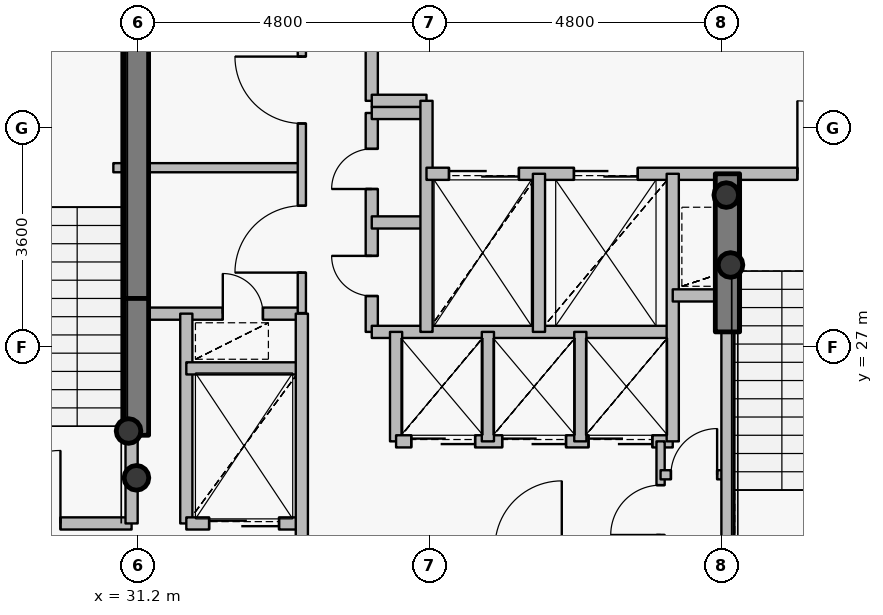
"""IFC4 building model, lengths in metres.
Left out: names, types, materials, properties, quantities, classifications, styles, units other than length and angle.
Written with IfcOpenShell. Run it as: python <this file> out.ifc"""

import sys

from ifc_helpers import new_model, si_unit, direction, frame, frame_2d, origin, origin_2d, place, context, subcontext, project, spatial, rectangle, hollow_circle, extrude, source, transform, mapped, element, fill, save


model = new_model("IFC4")
c1 = context("Model", 3, precision=1e-05, world=origin(), true_north=direction((0.0, 1.0)))
c2 = subcontext(c1, "Body", "Model", "MODEL_VIEW")
j1 = project(units=[si_unit("LENGTHUNIT", "METRE"), si_unit("PLANEANGLEUNIT", "RADIAN")], contexts=[c1])
p1 = place(None, origin())
s1 = spatial("IfcSite", under=j1, at=p1, CompositionType="ELEMENT")
p2 = place(p1, origin())
s2 = spatial("IfcBuilding", under=s1, at=p2, CompositionType="ELEMENT")
p3 = place(p2, frame((0.0, 0.0, 299.25)))
s3 = spatial("IfcBuildingStorey", under=s2, at=p3, CompositionType="ELEMENT", Elevation=299.25)
p4 = place(p3, frame((31.18, 27.8, 0.0), z_axis=(0.0, 0.0, 1.0), x_axis=(0.0, 1.0, 0.0)))
e1 = element("IfcWall", 1, at=p4, inside=s3, PredefinedType="SHEAR", context=c2, shape_type="SweptSolid", body=[
    extrude(rectangle(XDim=4.75, YDim=0.4, at=frame_2d((2.375, 0.0))), origin(), (0.0, 0.0, 1.0), 3.75),
])
for number, where, z_axis, x_axis in (
    (2, (31.05, 25.62, 0.0), (0.0, 0.0, 1.0), (1.0, 0.0, 0.0)),
    (3, (31.18, 24.85, 0.0), (0.0, 0.0, 1.0), (1.0, 0.0, 0.0)),
    (4, (40.95, 28.35, 0.0), (0.0, 0.0, 1.0), (1.0, 0.0, 0.0)),
    (5, (40.88, 29.5, 0.0), (0.0, 0.0, 1.0), (1.0, 0.0, 0.0)),
):
    element("IfcColumn", number, at=place(p3, frame(where, z_axis=z_axis, x_axis=x_axis)), inside=s3, PredefinedType="COLUMN", context=c2, shape_type="SweptSolid", body=[
        extrude(hollow_circle(Radius=0.203, WallThickness=0.016, at=origin_2d()), origin(), (0.0, 0.0, 1.0), 3.75),
    ])
p5 = place(p3, frame((31.18, 25.55, 0.0), z_axis=(0.0, 0.0, 1.0), x_axis=(0.0, 1.0, 0.0)))
e6 = element("IfcWall", 6, at=p5, inside=s3, PredefinedType="SHEAR", context=c2, shape_type="SweptSolid", body=[
    extrude(rectangle(XDim=2.25, YDim=0.4, at=frame_2d((1.125, 0.0))), origin(), (0.0, 0.0, 1.0), 3.1),
])
p6 = place(p3, frame((40.9, 27.25, 0.0), z_axis=(0.0, 0.0, 1.0), x_axis=(0.0, 1.0, 0.0)))
e7 = element("IfcWall", 7, at=p6, inside=s3, PredefinedType="SHEAR", context=c2, shape_type="SweptSolid", body=[
    extrude(rectangle(XDim=2.6, YDim=0.4, at=frame_2d((1.3, 0.0))), origin(), (0.0, 0.0, 1.0), 3.1),
])
p7 = place(p3, frame((27.56, 24.1, 0.0), z_axis=(0.0, 0.0, 1.0), x_axis=(1.0, 0.0, 0.0)))
e8 = element("IfcWall", 8, at=p7, inside=s3, PredefinedType="PARTITIONING", context=c2, shape_type="SweptSolid", body=[
    extrude(rectangle(XDim=3.54, YDim=0.2, at=frame_2d((1.77, 0.0))), origin(), (0.0, 0.0, 1.0), 3.5),
])
p8 = place(p7, frame((1.17, 0.0, 0.0)))
e9 = element("IfcOpeningElement", 9, at=p8, cuts=e8, PredefinedType="OPENING", context=c2, shape_type="SweptSolid", body=[
    extrude(rectangle(XDim=1.2, YDim=2.15, at=origin_2d()), frame((0.6, 0.11, 1.075), z_axis=(0.0, -1.0, 0.0), x_axis=(1.0, 0.0, 0.0)), (0.0, 0.0, 1.0), 0.22),
])
p9 = place(p3, frame((30.8, 29.95, 0.0), z_axis=(0.0, 0.0, 1.0), x_axis=(1.0, 0.0, 0.0)))
e10 = element("IfcWall", 10, at=p9, inside=s3, PredefinedType="PARTITIONING", context=c2, shape_type="SweptSolid", body=[
    extrude(rectangle(XDim=3.1, YDim=0.15, at=frame_2d((1.55, 0.0))), origin(), (0.0, 0.0, 1.0), 3.085),
])
p10 = place(p3, frame((31.1, 24.1, 0.0), z_axis=(0.0, 0.0, 1.0), x_axis=(0.0, 1.0, 0.0)))
e11 = element("IfcWall", 11, at=p10, inside=s3, PredefinedType="PARTITIONING", context=c2, shape_type="SweptSolid", body=[
    extrude(rectangle(XDim=1.44, YDim=0.2, at=frame_2d((0.72, 0.0))), origin(), (0.0, 0.0, 1.0), 3.5),
])
p11 = place(p3, frame((31.1, 27.55, 0.0), z_axis=(0.0, 0.0, 1.0), x_axis=(1.0, 0.0, 0.0)))
e12 = element("IfcWall", 12, at=p11, inside=s3, PredefinedType="PARTITIONING", context=c2, shape_type="SweptSolid", body=[
    extrude(rectangle(XDim=2.8, YDim=0.2, at=frame_2d((1.4, 0.0))), origin(), (0.0, 0.0, 1.0), 3.085),
])
p12 = place(p11, frame((1.5, 0.0, 0.0)))
e13 = element("IfcOpeningElement", 13, at=p12, cuts=e12, PredefinedType="OPENING", context=c2, shape_type="SweptSolid", body=[
    extrude(rectangle(XDim=0.66, YDim=2.05, at=origin_2d()), frame((0.33, 0.11, 1.025), z_axis=(0.0, -1.0, 0.0), x_axis=(1.0, 0.0, 0.0)), (0.0, 0.0, 1.0), 0.22),
])
p13 = place(p3, frame((32.0, 24.1, 0.0), z_axis=(0.0, 0.0, 1.0), x_axis=(0.0, 1.0, 0.0)))
e14 = element("IfcWall", 14, at=p13, inside=s3, PredefinedType="PARTITIONING", context=c2, shape_type="SweptSolid", body=[
    extrude(rectangle(XDim=3.45, YDim=0.2, at=frame_2d((1.725, 0.0))), origin(), (0.0, 0.0, 1.0), 3.5),
])
p14 = place(p3, frame((32.0, 24.1, 0.0), z_axis=(0.0, 0.0, 1.0), x_axis=(1.0, 0.0, 0.0)))
e15 = element("IfcWall", 15, at=p14, inside=s3, PredefinedType="PARTITIONING", context=c2, shape_type="SweptSolid", body=[
    extrude(rectangle(XDim=1.9, YDim=0.2, at=frame_2d((0.95, 0.0))), origin(), (0.0, 0.0, 1.0), 3.085),
])
p15 = place(p14, frame((0.375, 0.0, 0.0)))
e16 = element("IfcOpeningElement", 16, at=p15, cuts=e15, PredefinedType="OPENING", context=c2, shape_type="SweptSolid", body=[
    extrude(rectangle(XDim=1.15, YDim=2.15, at=origin_2d()), frame((0.575, 0.11, 1.075), z_axis=(0.0, -1.0, 0.0), x_axis=(1.0, 0.0, 0.0)), (0.0, 0.0, 1.0), 0.22),
])
p16 = place(p3, frame((32.0, 26.65, 0.0), z_axis=(0.0, 0.0, 1.0), x_axis=(1.0, 0.0, 0.0)))
e17 = element("IfcWall", 17, at=p16, inside=s3, PredefinedType="PARTITIONING", context=c2, shape_type="SweptSolid", body=[
    extrude(rectangle(XDim=1.9, YDim=0.2, at=frame_2d((0.95, 0.0))), origin(), (0.0, 0.0, 1.0), 3.085),
])
p17 = place(p3, frame((33.9, 20.9, 0.0), z_axis=(0.0, 0.0, 1.0), x_axis=(0.0, 1.0, 0.0)))
e18 = element("IfcWall", 18, at=p17, inside=s3, PredefinedType="PARTITIONING", context=c2, shape_type="SweptSolid", body=[
    extrude(rectangle(XDim=6.65, YDim=0.2, at=frame_2d((3.325, 0.0))), origin(), (0.0, 0.0, 1.0), 3.085),
])
p18 = place(p3, frame((33.9, 27.56, 0.0), z_axis=(0.0, 0.0, 1.0), x_axis=(0.0, 1.0, 0.0)))
e19 = element("IfcWall", 19, at=p18, inside=s3, PredefinedType="PARTITIONING", context=c2, shape_type="SweptSolid", body=[
    extrude(rectangle(XDim=5.54, YDim=0.135, at=frame_2d((2.77, 0.0))), origin(), (0.0, 0.0, 1.0), 3.085),
])
p19 = place(p18, frame((0.665, 0.0, 0.0)))
e20 = element("IfcOpeningElement", 20, at=p19, cuts=e19, PredefinedType="OPENING", context=c2, shape_type="SweptSolid", body=[
    extrude(rectangle(XDim=1.1, YDim=2.15, at=origin_2d()), frame((0.55, 0.078, 1.075), z_axis=(0.0, -1.0, 0.0), x_axis=(1.0, 0.0, 0.0)), (0.0, 0.0, 1.0), 0.155),
])
p20 = place(p18, frame((3.117, 0.0, 0.0)))
e21 = element("IfcOpeningElement", 21, at=p20, cuts=e19, PredefinedType="OPENING", context=c2, shape_type="SweptSolid", body=[
    extrude(rectangle(XDim=1.1, YDim=2.15, at=origin_2d()), frame((0.55, 0.078, 1.075), z_axis=(0.0, -1.0, 0.0), x_axis=(1.0, 0.0, 0.0)), (0.0, 0.0, 1.0), 0.155),
])
p21 = place(p3, frame((35.05, 27.25, 0.0), z_axis=(0.0, 0.0, 1.0), x_axis=(0.0, 1.0, 0.0)))
e22 = element("IfcWall", 22, at=p21, inside=s3, PredefinedType="PARTITIONING", context=c2, shape_type="SweptSolid", body=[
    extrude(rectangle(XDim=3.6, YDim=0.2, at=frame_2d((1.8, 0.0))), origin(), (0.0, 0.0, 1.0), 3.5),
])
p22 = place(p21, frame((0.59, 0.0, 0.0)))
e23 = element("IfcOpeningElement", 23, at=p22, cuts=e22, PredefinedType="OPENING", context=c2, shape_type="SweptSolid", body=[
    extrude(rectangle(XDim=0.66, YDim=2.05, at=origin_2d()), frame((0.33, 0.11, 1.025), z_axis=(0.0, -1.0, 0.0), x_axis=(1.0, 0.0, 0.0)), (0.0, 0.0, 1.0), 0.22),
])
p23 = place(p21, frame((2.35, 0.0, 0.0)))
e24 = element("IfcOpeningElement", 24, at=p23, cuts=e22, PredefinedType="OPENING", context=c2, shape_type="SweptSolid", body=[
    extrude(rectangle(XDim=0.66, YDim=2.05, at=origin_2d()), frame((0.33, 0.11, 1.025), z_axis=(0.0, -1.0, 0.0), x_axis=(1.0, 0.0, 0.0)), (0.0, 0.0, 1.0), 0.22),
])
p24 = place(p3, frame((35.05, 27.25, 0.0), z_axis=(0.0, 0.0, 1.0), x_axis=(1.0, 0.0, 0.0)))
e25 = element("IfcWall", 25, at=p24, inside=s3, PredefinedType="PARTITIONING", context=c2, shape_type="SweptSolid", body=[
    extrude(rectangle(XDim=4.95, YDim=0.2, at=frame_2d((2.475, 0.0))), origin(), (0.0, 0.0, 1.0), 3.085),
])
for number, where, z_axis, x_axis in (
    (26, (35.05, 29.05, 0.0), (0.0, 0.0, 1.0), (1.0, 0.0, 0.0)),
    (27, (35.05, 30.85, 0.0), (0.0, 0.0, 1.0), (1.0, 0.0, 0.0)),
):
    element("IfcWall", number, at=place(p3, frame(where, z_axis=z_axis, x_axis=x_axis)), inside=s3, PredefinedType="PARTITIONING", context=c2, shape_type="SweptSolid", body=[
        extrude(rectangle(XDim=0.9, YDim=0.2, at=frame_2d((0.45, 0.0))), origin(), (0.0, 0.0, 1.0), 3.5),
    ])
p25 = place(p3, frame((35.05, 31.05, 0.0), z_axis=(0.0, 0.0, 1.0), x_axis=(0.0, 1.0, 0.0)))
e28 = element("IfcWall", 28, at=p25, inside=s3, PredefinedType="PARTITIONING", context=c2, shape_type="SweptSolid", body=[
    extrude(rectangle(XDim=2.05, YDim=0.2, at=frame_2d((1.025, 0.0))), origin(), (0.0, 0.0, 1.0), 3.085),
])
p26 = place(p3, frame((35.05, 31.05, 0.0), z_axis=(0.0, 0.0, 1.0), x_axis=(1.0, 0.0, 0.0)))
e29 = element("IfcWall", 29, at=p26, inside=s3, PredefinedType="PARTITIONING", context=c2, shape_type="SweptSolid", body=[
    extrude(rectangle(XDim=0.9, YDim=0.2, at=frame_2d((0.45, 0.0))), origin(), (0.0, 0.0, 1.0), 3.5),
])
p27 = place(p3, frame((35.45, 25.45, 0.0), z_axis=(0.0, 0.0, 1.0), x_axis=(0.0, 1.0, 0.0)))
e30 = element("IfcWall", 30, at=p27, inside=s3, PredefinedType="PARTITIONING", context=c2, shape_type="SweptSolid", body=[
    extrude(rectangle(XDim=1.8, YDim=0.2, at=frame_2d((0.9, 0.0))), origin(), (0.0, 0.0, 1.0), 3.5),
])
p28 = place(p3, frame((35.45, 25.45, 0.0), z_axis=(0.0, 0.0, 1.0), x_axis=(1.0, 0.0, 0.0)))
e31 = element("IfcWall", 31, at=p28, inside=s3, PredefinedType="PARTITIONING", context=c2, shape_type="SweptSolid", body=[
    extrude(rectangle(XDim=4.55, YDim=0.2, at=frame_2d((2.275, 0.0))), origin(), (0.0, 0.0, 1.0), 3.085),
])
p29 = place(p28, frame((0.25, 0.0, 0.0)))
e32 = element("IfcOpeningElement", 32, at=p29, cuts=e31, PredefinedType="OPENING", context=c2, shape_type="SweptSolid", body=[
    extrude(rectangle(XDim=1.05, YDim=2.15, at=origin_2d()), frame((0.525, 0.11, 1.075), z_axis=(0.0, -1.0, 0.0), x_axis=(1.0, 0.0, 0.0)), (0.0, 0.0, 1.0), 0.22),
])
p30 = place(p28, frame((1.745, 0.0, 0.0)))
e33 = element("IfcOpeningElement", 33, at=p30, cuts=e31, PredefinedType="OPENING", context=c2, shape_type="SweptSolid", body=[
    extrude(rectangle(XDim=1.05, YDim=2.15, at=origin_2d()), frame((0.525, 0.11, 1.075), z_axis=(0.0, -1.0, 0.0), x_axis=(1.0, 0.0, 0.0)), (0.0, 0.0, 1.0), 0.22),
])
p31 = place(p28, frame((3.165, 0.0, 0.0)))
e34 = element("IfcOpeningElement", 34, at=p31, cuts=e31, PredefinedType="OPENING", context=c2, shape_type="SweptSolid", body=[
    extrude(rectangle(XDim=1.05, YDim=2.15, at=origin_2d()), frame((0.525, 0.11, 1.075), z_axis=(0.0, -1.0, 0.0), x_axis=(1.0, 0.0, 0.0)), (0.0, 0.0, 1.0), 0.22),
])
p32 = place(p3, frame((35.95, 27.25, 0.0), z_axis=(0.0, 0.0, 1.0), x_axis=(0.0, 1.0, 0.0)))
e35 = element("IfcWall", 35, at=p32, inside=s3, PredefinedType="PARTITIONING", context=c2, shape_type="SweptSolid", body=[
    extrude(rectangle(XDim=3.8, YDim=0.2, at=frame_2d((1.9, 0.0))), origin(), (0.0, 0.0, 1.0), 3.5),
])
p33 = place(p3, frame((35.95, 29.85, 0.0), z_axis=(0.0, 0.0, 1.0), x_axis=(1.0, 0.0, 0.0)))
e36 = element("IfcWall", 36, at=p33, inside=s3, PredefinedType="PARTITIONING", context=c2, shape_type="SweptSolid", body=[
    extrude(rectangle(XDim=8.49, YDim=0.2, at=frame_2d((4.245, 0.0))), origin(), (0.0, 0.0, 1.0), 3.085),
])
p34 = place(p33, frame((6.1, 0.0, 0.0)))
e37 = element("IfcOpeningElement", 37, at=p34, cuts=e36, PredefinedType="OPENING", context=c2, shape_type="SweptSolid", body=[
    extrude(rectangle(XDim=1.2, YDim=2.15, at=origin_2d()), frame((0.6, 0.11, 1.075), z_axis=(0.0, -1.0, 0.0), x_axis=(1.0, 0.0, 0.0)), (0.0, 0.0, 1.0), 0.22),
])
p35 = place(p33, frame((0.37, 0.0, 0.0)))
e38 = element("IfcOpeningElement", 38, at=p35, cuts=e36, PredefinedType="OPENING", context=c2, shape_type="SweptSolid", body=[
    extrude(rectangle(XDim=1.15, YDim=2.15, at=origin_2d()), frame((0.575, 0.11, 1.075), z_axis=(0.0, -1.0, 0.0), x_axis=(1.0, 0.0, 0.0)), (0.0, 0.0, 1.0), 0.22),
])
p36 = place(p33, frame((2.425, 0.0, 0.0)))
e39 = element("IfcOpeningElement", 39, at=p36, cuts=e36, PredefinedType="OPENING", context=c2, shape_type="SweptSolid", body=[
    extrude(rectangle(XDim=1.05, YDim=2.15, at=origin_2d()), frame((0.525, 0.11, 1.075), z_axis=(0.0, -1.0, 0.0), x_axis=(1.0, 0.0, 0.0)), (0.0, 0.0, 1.0), 0.22),
])
p37 = place(p3, frame((36.96, 25.45, 0.0), z_axis=(0.0, 0.0, 1.0), x_axis=(0.0, 1.0, 0.0)))
e40 = element("IfcWall", 40, at=p37, inside=s3, PredefinedType="PARTITIONING", context=c2, shape_type="SweptSolid", body=[
    extrude(rectangle(XDim=1.8, YDim=0.2, at=frame_2d((0.9, 0.0))), origin(), (0.0, 0.0, 1.0), 3.5),
])
p38 = place(p3, frame((37.8, 27.25, 0.0), z_axis=(0.0, 0.0, 1.0), x_axis=(0.0, 1.0, 0.0)))
e41 = element("IfcWall", 41, at=p38, inside=s3, PredefinedType="PARTITIONING", context=c2, shape_type="SweptSolid", body=[
    extrude(rectangle(XDim=2.6, YDim=0.2, at=frame_2d((1.3, 0.0))), origin(), (0.0, 0.0, 1.0), 3.5),
])
p39 = place(p3, frame((38.48, 25.45, 0.0), z_axis=(0.0, 0.0, 1.0), x_axis=(0.0, 1.0, 0.0)))
e42 = element("IfcWall", 42, at=p39, inside=s3, PredefinedType="PARTITIONING", context=c2, shape_type="SweptSolid", body=[
    extrude(rectangle(XDim=1.8, YDim=0.2, at=frame_2d((0.9, 0.0))), origin(), (0.0, 0.0, 1.0), 3.5),
])
p40 = place(p3, frame((39.8, 23.7, 0.0), z_axis=(0.0, 0.0, 1.0), x_axis=(0.0, 1.0, 0.0)))
e43 = element("IfcWall", 43, at=p40, inside=s3, PredefinedType="PARTITIONING", context=c2, shape_type="SweptSolid", body=[
    extrude(rectangle(XDim=1.75, YDim=0.135, at=frame_2d((0.875, 0.0))), origin(), (0.0, 0.0, 1.0), 3.5),
])
p41 = place(p40, frame((0.21, 0.0, 0.0)))
e44 = element("IfcOpeningElement", 44, at=p41, cuts=e43, PredefinedType="OPENING", context=c2, shape_type="SweptSolid", body=[
    extrude(rectangle(XDim=0.82, YDim=2.1, at=origin_2d()), frame((0.41, 0.078, 1.05), z_axis=(0.0, -1.0, 0.0), x_axis=(1.0, 0.0, 0.0)), (0.0, 0.0, 1.0), 0.155),
])
p42 = place(p3, frame((39.8, 24.9, 0.0), z_axis=(0.0, 0.0, 1.0), x_axis=(1.0, 0.0, 0.0)))
e45 = element("IfcWall", 45, at=p42, inside=s3, PredefinedType="PARTITIONING", context=c2, shape_type="SweptSolid", body=[
    extrude(rectangle(XDim=1.1, YDim=0.15, at=frame_2d((0.55, 0.0))), origin(), (0.0, 0.0, 1.0), 3.5),
])
p43 = place(p42, frame((0.17, 0.0, 0.0)))
e46 = element("IfcOpeningElement", 46, at=p43, cuts=e45, PredefinedType="OPENING", context=c2, shape_type="SweptSolid", body=[
    extrude(rectangle(XDim=0.76, YDim=2.1, at=origin_2d()), frame((0.38, 0.085, 1.05), z_axis=(0.0, -1.0, 0.0), x_axis=(1.0, 0.0, 0.0)), (0.0, 0.0, 1.0), 0.17),
])
p44 = place(p3, frame((40.0, 25.45, 0.0), z_axis=(0.0, 0.0, 1.0), x_axis=(0.0, 1.0, 0.0)))
e47 = element("IfcWall", 47, at=p44, inside=s3, PredefinedType="PARTITIONING", context=c2, shape_type="SweptSolid", body=[
    extrude(rectangle(XDim=4.4, YDim=0.2, at=frame_2d((2.2, 0.0))), origin(), (0.0, 0.0, 1.0), 3.5),
])
p45 = place(p3, frame((40.0, 27.85, 0.0), z_axis=(0.0, 0.0, 1.0), x_axis=(1.0, 0.0, 0.0)))
e48 = element("IfcWall", 48, at=p45, inside=s3, PredefinedType="PARTITIONING", context=c2, shape_type="SweptSolid", body=[
    extrude(rectangle(XDim=0.9, YDim=0.2, at=frame_2d((0.45, 0.0))), origin(), (0.0, 0.0, 1.0), 3.5),
])
p46 = place(p3, frame((40.9, 21.33, 0.0), z_axis=(0.0, 0.0, 1.0), x_axis=(0.0, 1.0, 0.0)))
e49 = element("IfcWall", 49, at=p46, inside=s3, PredefinedType="PARTITIONING", context=c2, shape_type="SweptSolid", body=[
    extrude(rectangle(XDim=5.91, YDim=0.2, at=frame_2d((2.955, 0.0))), origin(), (0.0, 0.0, 1.0), 3.035),
])
m1 = source(origin(), c2, "Body", "SweptSolid", [
    extrude(rectangle(XDim=1.2, YDim=2.15, at=origin_2d()), frame((0.6, 0.025, 1.075), z_axis=(0.0, -1.0, 0.0), x_axis=(1.0, 0.0, 0.0)), (0.0, 0.0, 1.0), 0.05),
])
p47 = place(p8, origin())
e50 = element("IfcDoor", 50, at=p47, inside=s3, OperationType="SINGLE_SWING_RIGHT", PredefinedType="DOOR", context=c2, shape_type="MappedRepresentation", body=[
    mapped(m1, transform((0.0, 0.0, 0.0), x_axis=(1.0, 0.0, 0.0), y_axis=(0.0, 1.0, 0.0), z_axis=(0.0, 0.0, 1.0), scale=1.0)),
])
fill(e9, e50)
p48 = place(p34, origin())
e51 = element("IfcDoor", 51, at=p48, inside=s3, OperationType="SINGLE_SWING_LEFT", PredefinedType="DOOR", context=c2, shape_type="MappedRepresentation", body=[
    mapped(m1, transform((0.0, 0.0, 0.0), x_axis=(1.0, 0.0, 0.0), y_axis=(0.0, 1.0, 0.0), z_axis=(0.0, 0.0, 1.0), scale=1.0)),
])
fill(e37, e51)
m2 = source(origin(), c2, "Body", "SweptSolid", [
    extrude(rectangle(XDim=1.15, YDim=2.15, at=origin_2d()), frame((0.575, 0.025, 1.075), z_axis=(0.0, -1.0, 0.0), x_axis=(1.0, 0.0, 0.0)), (0.0, 0.0, 1.0), 0.05),
])
p49 = place(p35, origin())
e52 = element("IfcDoor", 52, at=p49, inside=s3, OperationType="DOUBLE_DOOR_SLIDING", PredefinedType="USERDEFINED", context=c2, shape_type="MappedRepresentation", body=[
    mapped(m2, transform((0.0, 0.0, 0.0), x_axis=(1.0, 0.0, 0.0), y_axis=(0.0, 1.0, 0.0), z_axis=(0.0, 0.0, 1.0), scale=1.0)),
])
fill(e38, e52)
p50 = place(p15, origin())
e53 = element("IfcDoor", 53, at=p50, inside=s3, OperationType="DOUBLE_DOOR_SLIDING", PredefinedType="USERDEFINED", context=c2, shape_type="MappedRepresentation", body=[
    mapped(m2, transform((0.0, 0.0, 0.0), x_axis=(1.0, 0.0, 0.0), y_axis=(0.0, 1.0, 0.0), z_axis=(0.0, 0.0, 1.0), scale=1.0)),
])
fill(e16, e53)
m3 = source(origin(), c2, "Body", "SweptSolid", [
    extrude(rectangle(XDim=1.05, YDim=2.15, at=origin_2d()), frame((0.525, 0.025, 1.075), z_axis=(0.0, -1.0, 0.0), x_axis=(1.0, 0.0, 0.0)), (0.0, 0.0, 1.0), 0.05),
])
p51 = place(p36, origin())
e54 = element("IfcDoor", 54, at=p51, inside=s3, OperationType="DOUBLE_DOOR_SLIDING", PredefinedType="USERDEFINED", context=c2, shape_type="MappedRepresentation", body=[
    mapped(m3, transform((0.0, 0.0, 0.0), x_axis=(1.0, 0.0, 0.0), y_axis=(0.0, 1.0, 0.0), z_axis=(0.0, 0.0, 1.0), scale=1.0)),
])
fill(e39, e54)
p52 = place(p29, origin())
e55 = element("IfcDoor", 55, at=p52, inside=s3, OperationType="DOUBLE_DOOR_SLIDING", PredefinedType="USERDEFINED", context=c2, shape_type="MappedRepresentation", body=[
    mapped(m3, transform((0.0, 0.0, 0.0), x_axis=(1.0, 0.0, 0.0), y_axis=(0.0, 1.0, 0.0), z_axis=(0.0, 0.0, 1.0), scale=1.0)),
])
fill(e32, e55)
p53 = place(p30, origin())
e56 = element("IfcDoor", 56, at=p53, inside=s3, OperationType="DOUBLE_DOOR_SLIDING", PredefinedType="USERDEFINED", context=c2, shape_type="MappedRepresentation", body=[
    mapped(m3, transform((0.0, 0.0, 0.0), x_axis=(1.0, 0.0, 0.0), y_axis=(0.0, 1.0, 0.0), z_axis=(0.0, 0.0, 1.0), scale=1.0)),
])
fill(e33, e56)
p54 = place(p31, origin())
e57 = element("IfcDoor", 57, at=p54, inside=s3, OperationType="DOUBLE_DOOR_SLIDING", PredefinedType="USERDEFINED", context=c2, shape_type="MappedRepresentation", body=[
    mapped(m3, transform((0.0, 0.0, 0.0), x_axis=(1.0, 0.0, 0.0), y_axis=(0.0, 1.0, 0.0), z_axis=(0.0, 0.0, 1.0), scale=1.0)),
])
fill(e34, e57)
m4 = source(origin(), c2, "Body", "SweptSolid", [
    extrude(rectangle(XDim=0.66, YDim=2.05, at=origin_2d()), frame((0.33, 0.025, 1.025), z_axis=(0.0, -1.0, 0.0), x_axis=(1.0, 0.0, 0.0)), (0.0, 0.0, 1.0), 0.05),
])
p55 = place(p22, origin())
e58 = element("IfcDoor", 58, at=p55, inside=s3, OperationType="SINGLE_SWING_RIGHT", PredefinedType="USERDEFINED", context=c2, shape_type="MappedRepresentation", body=[
    mapped(m4, transform((0.0, 0.0, 0.0), x_axis=(1.0, 0.0, 0.0), y_axis=(0.0, 1.0, 0.0), z_axis=(0.0, 0.0, 1.0), scale=1.0)),
])
fill(e23, e58)
p56 = place(p23, origin())
e59 = element("IfcDoor", 59, at=p56, inside=s3, OperationType="SINGLE_SWING_LEFT", PredefinedType="USERDEFINED", context=c2, shape_type="MappedRepresentation", body=[
    mapped(m4, transform((0.0, 0.0, 0.0), x_axis=(1.0, 0.0, 0.0), y_axis=(0.0, 1.0, 0.0), z_axis=(0.0, 0.0, 1.0), scale=1.0)),
])
fill(e24, e59)
m5 = source(origin(), c2, "Body", "SweptSolid", [
    extrude(rectangle(XDim=1.1, YDim=2.15, at=origin_2d()), frame((0.55, 0.025, 1.075), z_axis=(0.0, -1.0, 0.0), x_axis=(1.0, 0.0, 0.0)), (0.0, 0.0, 1.0), 0.05),
])
p57 = place(p19, origin())
e60 = element("IfcDoor", 60, at=p57, inside=s3, OperationType="SINGLE_SWING_LEFT", PredefinedType="DOOR", context=c2, shape_type="MappedRepresentation", body=[
    mapped(m5, transform((0.0, 0.0, 0.0), x_axis=(1.0, 0.0, 0.0), y_axis=(0.0, 1.0, 0.0), z_axis=(0.0, 0.0, 1.0), scale=1.0)),
])
fill(e20, e60)
p58 = place(p20, origin())
e61 = element("IfcDoor", 61, at=p58, inside=s3, OperationType="SINGLE_SWING_RIGHT", PredefinedType="DOOR", context=c2, shape_type="MappedRepresentation", body=[
    mapped(m5, transform((0.0, 0.0, 0.0), x_axis=(1.0, 0.0, 0.0), y_axis=(0.0, 1.0, 0.0), z_axis=(0.0, 0.0, 1.0), scale=1.0)),
])
fill(e21, e61)
m6 = source(origin(), c2, "Body", "SweptSolid", [
    extrude(rectangle(XDim=0.82, YDim=2.1, at=origin_2d()), frame((0.41, 0.025, 1.05), z_axis=(0.0, -1.0, 0.0), x_axis=(1.0, 0.0, 0.0)), (0.0, 0.0, 1.0), 0.05),
])
p59 = place(p41, origin())
e62 = element("IfcDoor", 62, at=p59, inside=s3, OperationType="SINGLE_SWING_LEFT", PredefinedType="DOOR", context=c2, shape_type="MappedRepresentation", body=[
    mapped(m6, transform((0.0, 0.0, 0.0), x_axis=(1.0, 0.0, 0.0), y_axis=(0.0, 1.0, 0.0), z_axis=(0.0, 0.0, 1.0), scale=1.0)),
])
fill(e44, e62)
m7 = source(origin(), c2, "Body", "SweptSolid", [
    extrude(rectangle(XDim=0.76, YDim=2.1, at=origin_2d()), frame((0.38, 0.025, 1.05), z_axis=(0.0, -1.0, 0.0), x_axis=(1.0, 0.0, 0.0)), (0.0, 0.0, 1.0), 0.05),
])
p60 = place(p43, origin())
e63 = element("IfcDoor", 63, at=p60, inside=s3, OperationType="SINGLE_SWING_RIGHT", PredefinedType="DOOR", context=c2, shape_type="MappedRepresentation", body=[
    mapped(m7, transform((0.0, 0.0, 0.0), x_axis=(1.0, 0.0, 0.0), y_axis=(0.0, 1.0, 0.0), z_axis=(0.0, 0.0, 1.0), scale=1.0)),
])
fill(e46, e63)
p61 = place(p12, origin())
e64 = element("IfcDoor", 64, at=p61, inside=s3, OperationType="SINGLE_SWING_LEFT", PredefinedType="USERDEFINED", context=c2, shape_type="MappedRepresentation", body=[
    mapped(m4, transform((0.0, 0.0, 0.0), x_axis=(1.0, 0.0, 0.0), y_axis=(0.0, 1.0, 0.0), z_axis=(0.0, 0.0, 1.0), scale=1.0)),
])
fill(e13, e64)
save(model, sys.argv[1])
